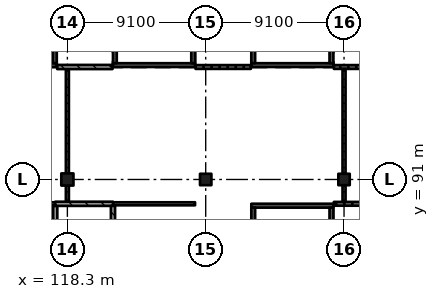
"""IFC4 building model, lengths in metres.
Left out: names, types, materials, properties, quantities, classifications, styles, units other than length and angle.
Written with IfcOpenShell. Run it as: python <this file> out.ifc"""

import sys

from ifc_helpers import new_model, si_unit, direction, frame, frame_2d, origin, origin_2d, place, context, subcontext, project, spatial, rectangle, extrude, element, fill, save


model = new_model("IFC4")
c1 = context("Model", 3, precision=1e-05, world=origin(), true_north=direction((0.0, 1.0)))
c2 = subcontext(c1, "Body", "Model", "MODEL_VIEW")
j1 = project(units=[si_unit("LENGTHUNIT", "METRE"), si_unit("PLANEANGLEUNIT", "RADIAN")], contexts=[c1])
p1 = place(None, origin())
s1 = spatial("IfcSite", under=j1, at=p1, CompositionType="ELEMENT")
p2 = place(p1, origin())
s2 = spatial("IfcBuilding", under=s1, at=p2, CompositionType="ELEMENT")
p3 = place(p2, frame((0.0, 0.0, 10.92)))
s3 = spatial("IfcBuildingStorey", under=s2, at=p3, CompositionType="ELEMENT", Elevation=10.92)
p4 = place(p3, frame((118.3, 91.0, 0.0), z_axis=(0.0, 0.0, 1.0), x_axis=(1.0, 0.0, 0.0)))
e1 = element("IfcColumn", 1, at=p4, inside=s3, PredefinedType="COLUMN", context=c2, shape_type="SweptSolid", body=[
    extrude(rectangle(XDim=0.8, YDim=0.8, at=origin_2d()), origin(), (0.0, 0.0, 1.0), 4.55),
])
for number, where, z_axis, x_axis in (
    (2, (127.4, 91.0, 0.0), (0.0, 0.0, 1.0), (1.0, 0.0, 0.0)),
    (3, (136.5, 91.0, 0.0), (0.0, 0.0, 1.0), (1.0, 0.0, 0.0)),
):
    element("IfcColumn", number, at=place(p3, frame(where, z_axis=z_axis, x_axis=x_axis)), inside=s3, PredefinedType="COLUMN", context=c2, shape_type="SweptSolid", body=[
        extrude(rectangle(XDim=0.75, YDim=0.75, at=origin_2d()), origin(), (0.0, 0.0, 1.0), 4.55),
    ])
p5 = place(p3, frame((135.8, 98.525, 0.0), z_axis=(0.0, 0.0, 1.0), x_axis=(-1.0, 0.0, 0.0)))
e4 = element("IfcWall", 4, at=p5, inside=s3, PredefinedType="SHEAR", context=c2, shape_type="SweptSolid", body=[
    extrude(rectangle(XDim=5.4, YDim=0.25, at=frame_2d((2.7, 0.0))), origin(), (0.0, 0.0, 1.0), 4.55),
])
p6 = place(p5, frame((1.5, 0.0, 0.0)))
e5 = element("IfcOpeningElement", 5, at=p6, cuts=e4, PredefinedType="OPENING", context=c2, shape_type="SweptSolid", body=[
    extrude(rectangle(XDim=2.4, YDim=2.1, at=frame_2d((1.2, 1.05))), frame((0.0, 0.135, 0.0), z_axis=(0.0, -1.0, 0.0), x_axis=(1.0, 0.0, 0.0)), (0.0, 0.0, 1.0), 0.27),
])
for number, where, z_axis, x_axis in (
    (6, (130.525, 108.25, 0.0), (0.0, 0.0, 1.0), (0.0, -1.0, 0.0)),
    (7, (135.675, 108.25, 0.0), (0.0, 0.0, 1.0), (0.0, -1.0, 0.0)),
):
    element("IfcWall", number, at=place(p3, frame(where, z_axis=z_axis, x_axis=x_axis)), inside=s3, PredefinedType="SHEAR", context=c2, shape_type="SweptSolid", body=[
        extrude(rectangle(XDim=9.6, YDim=0.25, at=frame_2d((4.8, 0.0))), origin(), (0.0, 0.0, 1.0), 4.55),
    ])
p7 = place(p3, frame((126.7, 98.525, 0.0), z_axis=(0.0, 0.0, 1.0), x_axis=(-1.0, 0.0, 0.0)))
e8 = element("IfcWall", 8, at=p7, inside=s3, PredefinedType="SHEAR", context=c2, shape_type="SweptSolid", body=[
    extrude(rectangle(XDim=5.4, YDim=0.25, at=frame_2d((2.7, 0.0))), origin(), (0.0, 0.0, 1.0), 4.55),
])
p8 = place(p7, frame((1.5, 0.0, 0.0)))
e9 = element("IfcOpeningElement", 9, at=p8, cuts=e8, PredefinedType="OPENING", context=c2, shape_type="SweptSolid", body=[
    extrude(rectangle(XDim=2.4, YDim=2.1, at=frame_2d((1.2, 1.05))), frame((0.0, 0.135, 0.0), z_axis=(0.0, -1.0, 0.0), x_axis=(1.0, 0.0, 0.0)), (0.0, 0.0, 1.0), 0.27),
])
for number, where, z_axis, x_axis in (
    (10, (121.425, 108.25, 0.0), (0.0, 0.0, 1.0), (0.0, -1.0, 0.0)),
    (11, (126.575, 108.25, 0.0), (0.0, 0.0, 1.0), (0.0, -1.0, 0.0)),
):
    element("IfcWall", number, at=place(p3, frame(where, z_axis=z_axis, x_axis=x_axis)), inside=s3, PredefinedType="SHEAR", context=c2, shape_type="SweptSolid", body=[
        extrude(rectangle(XDim=9.6, YDim=0.25, at=frame_2d((4.8, 0.0))), origin(), (0.0, 0.0, 1.0), 4.55),
    ])
p9 = place(p3, frame((117.6, 98.525, 0.0), z_axis=(0.0, 0.0, 1.0), x_axis=(-1.0, 0.0, 0.0)))
e12 = element("IfcWall", 12, at=p9, inside=s3, PredefinedType="SHEAR", context=c2, shape_type="SweptSolid", body=[
    extrude(rectangle(XDim=5.4, YDim=0.25, at=frame_2d((2.7, 0.0))), origin(), (0.0, 0.0, 1.0), 4.55),
])
p10 = place(p9, frame((1.5, 0.0, 0.0)))
e13 = element("IfcOpeningElement", 13, at=p10, cuts=e12, PredefinedType="OPENING", context=c2, shape_type="SweptSolid", body=[
    extrude(rectangle(XDim=2.4, YDim=2.1, at=frame_2d((1.2, 1.05))), frame((0.0, 0.135, 0.0), z_axis=(0.0, -1.0, 0.0), x_axis=(1.0, 0.0, 0.0)), (0.0, 0.0, 1.0), 0.27),
])
p11 = place(p3, frame((117.475, 108.25, 0.0), z_axis=(0.0, 0.0, 1.0), x_axis=(0.0, -1.0, 0.0)))
e14 = element("IfcWall", 14, at=p11, inside=s3, PredefinedType="SHEAR", context=c2, shape_type="SweptSolid", body=[
    extrude(rectangle(XDim=9.6, YDim=0.25, at=frame_2d((4.8, 0.0))), origin(), (0.0, 0.0, 1.0), 4.55),
])
p12 = place(p3, frame((135.8, 89.275, 0.0), z_axis=(0.0, 0.0, 1.0), x_axis=(-1.0, 0.0, 0.0)))
e15 = element("IfcWall", 15, at=p12, inside=s3, PredefinedType="SHEAR", context=c2, shape_type="SweptSolid", body=[
    extrude(rectangle(XDim=5.4, YDim=0.25, at=frame_2d((2.7, 0.0))), origin(), (0.0, 0.0, 1.0), 4.55),
])
p13 = place(p12, frame((1.5, 0.0, 0.0)))
e16 = element("IfcOpeningElement", 16, at=p13, cuts=e15, PredefinedType="OPENING", context=c2, shape_type="SweptSolid", body=[
    extrude(rectangle(XDim=2.4, YDim=2.1, at=frame_2d((1.2, 1.05))), frame((0.0, 0.135, 0.0), z_axis=(0.0, -1.0, 0.0), x_axis=(1.0, 0.0, 0.0)), (0.0, 0.0, 1.0), 0.27),
])
for number, where, z_axis, x_axis in (
    (17, (130.525, 89.15, 0.0), (0.0, 0.0, 1.0), (0.0, -1.0, 0.0)),
    (18, (135.675, 89.15, 0.0), (0.0, 0.0, 1.0), (0.0, -1.0, 0.0)),
):
    element("IfcWall", number, at=place(p3, frame(where, z_axis=z_axis, x_axis=x_axis)), inside=s3, PredefinedType="SHEAR", context=c2, shape_type="SweptSolid", body=[
        extrude(rectangle(XDim=9.6, YDim=0.25, at=frame_2d((4.8, 0.0))), origin(), (0.0, 0.0, 1.0), 4.55),
    ])
p14 = place(p3, frame((117.5, 86.43, 0.0), z_axis=(0.0, 0.0, 1.0), x_axis=(0.0, 1.0, 0.0)))
e19 = element("IfcWall", 19, at=p14, inside=s3, PredefinedType="SOLIDWALL", context=c2, shape_type="SweptSolid", body=[
    extrude(rectangle(XDim=2.833, YDim=0.275, at=frame_2d((1.416, 0.0))), origin(), (0.0, 0.0, 1.0), 4.25),
])
p15 = place(p3, frame((117.5, 89.4, 0.0), z_axis=(0.0, 0.0, 1.0), x_axis=(-1.0, 0.0, 0.0)))
e20 = element("IfcWall", 20, at=p15, inside=s3, PredefinedType="PARTITIONING", context=c2, shape_type="SweptSolid", body=[
    extrude(rectangle(XDim=5.3, YDim=0.2, at=frame_2d((2.65, 0.0))), origin(), (0.0, 0.0, 1.0), 4.25),
])
p16 = place(p15, frame((1.75, 0.0, 0.0)))
e21 = element("IfcOpeningElement", 21, at=p16, cuts=e20, PredefinedType="OPENING", context=c2, shape_type="SweptSolid", body=[
    extrude(rectangle(XDim=1.8, YDim=2.4, at=frame_2d((0.9, 1.2))), frame((0.0, 0.11, 0.0), z_axis=(0.0, -1.0, 0.0), x_axis=(1.0, 0.0, 0.0)), (0.0, 0.0, 1.0), 0.22),
])
p17 = place(p3, frame((117.63, 98.4, 0.0), z_axis=(0.0, 0.0, 1.0), x_axis=(1.0, 0.0, 0.0)))
e22 = element("IfcWall", 22, at=p17, inside=s3, PredefinedType="SOLIDWALL", context=c2, shape_type="SweptSolid", body=[
    extrude(rectangle(XDim=3.64, YDim=0.275, at=frame_2d((1.82, 0.0))), origin(), (0.0, 0.0, 1.0), 4.25),
])
p18 = place(p17, frame((1.52, 0.0, 0.0)))
e23 = element("IfcOpeningElement", 23, at=p18, cuts=e22, PredefinedType="OPENING", context=c2, shape_type="SweptSolid", body=[
    extrude(rectangle(XDim=1.2, YDim=2.4, at=frame_2d((0.6, 1.2))), frame((0.0, 0.147, 0.0), z_axis=(0.0, -1.0, 0.0), x_axis=(1.0, 0.0, 0.0)), (0.0, 0.0, 1.0), 0.295),
])
p19 = place(p3, frame((117.5, 89.4, 0.0), z_axis=(0.0, 0.0, 1.0), x_axis=(1.0, 0.0, 0.0)))
e24 = element("IfcWall", 24, at=p19, inside=s3, PredefinedType="SOLIDWALL", context=c2, shape_type="SweptSolid", body=[
    extrude(rectangle(XDim=3.8, YDim=0.275, at=frame_2d((1.9, 0.0))), origin(), (0.0, 0.0, 1.0), 4.25),
])
p20 = place(p19, frame((1.65, 0.0, 0.0)))
e25 = element("IfcOpeningElement", 25, at=p20, cuts=e24, PredefinedType="OPENING", context=c2, shape_type="SweptSolid", body=[
    extrude(rectangle(XDim=1.2, YDim=2.4, at=frame_2d((0.6, 1.2))), frame((0.0, 0.147, 0.0), z_axis=(0.0, -1.0, 0.0), x_axis=(1.0, 0.0, 0.0)), (0.0, 0.0, 1.0), 0.295),
])
p21 = place(p3, frame((118.3, 89.538, 0.0), z_axis=(0.0, 0.0, 1.0), x_axis=(0.0, 1.0, 0.0)))
e26 = element("IfcWall", 26, at=p21, inside=s3, PredefinedType="PARTITIONING", context=c2, shape_type="SweptSolid", body=[
    extrude(rectangle(XDim=1.062, YDim=0.2, at=frame_2d((0.531, 0.0))), origin(), (0.0, 0.0, 1.0), 3.55),
])
p22 = place(p3, frame((118.3, 91.4, 0.0), z_axis=(0.0, 0.0, 1.0), x_axis=(0.0, 1.0, 0.0)))
e27 = element("IfcWall", 27, at=p22, inside=s3, PredefinedType="PARTITIONING", context=c2, shape_type="SweptSolid", body=[
    extrude(rectangle(XDim=6.863, YDim=0.2, at=frame_2d((3.431, 0.0))), origin(), (0.0, 0.0, 1.0), 3.55),
])
p23 = place(p22, frame((0.85, 0.0, 0.0)))
e28 = element("IfcOpeningElement", 28, at=p23, cuts=e27, PredefinedType="OPENING", context=c2, shape_type="SweptSolid", body=[
    extrude(rectangle(XDim=1.8, YDim=2.4, at=frame_2d((0.9, 1.2))), frame((0.0, 0.11, 0.0), z_axis=(0.0, -1.0, 0.0), x_axis=(1.0, 0.0, 0.0)), (0.0, 0.0, 1.0), 0.22),
])
p24 = place(p22, frame((4.25, 0.0, 0.0)))
e29 = element("IfcOpeningElement", 29, at=p24, cuts=e27, PredefinedType="OPENING", context=c2, shape_type="SweptSolid", body=[
    extrude(rectangle(XDim=1.8, YDim=2.4, at=frame_2d((0.9, 1.2))), frame((0.0, 0.11, 0.0), z_axis=(0.0, -1.0, 0.0), x_axis=(1.0, 0.0, 0.0)), (0.0, 0.0, 1.0), 0.22),
])
p25 = place(p3, frame((121.3, 89.262, 0.0), z_axis=(0.0, 0.0, 1.0), x_axis=(0.0, -1.0, 0.0)))
e30 = element("IfcWall", 30, at=p25, inside=s3, PredefinedType="SOLIDWALL", context=c2, shape_type="SweptSolid", body=[
    extrude(rectangle(XDim=2.725, YDim=0.275, at=frame_2d((1.362, 0.0))), origin(), (0.0, 0.0, 1.0), 4.25),
])
p26 = place(p3, frame((126.7, 89.4, 0.0), z_axis=(0.0, 0.0, 1.0), x_axis=(-1.0, 0.0, 0.0)))
e31 = element("IfcWall", 31, at=p26, inside=s3, PredefinedType="PARTITIONING", context=c2, shape_type="SweptSolid", body=[
    extrude(rectangle(XDim=5.4, YDim=0.2, at=frame_2d((2.7, 0.0))), origin(), (0.0, 0.0, 1.0), 4.25),
])
p27 = place(p26, frame((1.85, 0.0, 0.0)))
e32 = element("IfcOpeningElement", 32, at=p27, cuts=e31, PredefinedType="OPENING", context=c2, shape_type="SweptSolid", body=[
    extrude(rectangle(XDim=1.8, YDim=2.4, at=frame_2d((0.9, 1.2))), frame((0.0, 0.11, 0.0), z_axis=(0.0, -1.0, 0.0), x_axis=(1.0, 0.0, 0.0)), (0.0, 0.0, 1.0), 0.22),
])
p28 = place(p3, frame((126.73, 98.4, 0.0), z_axis=(0.0, 0.0, 1.0), x_axis=(1.0, 0.0, 0.0)))
e33 = element("IfcWall", 33, at=p28, inside=s3, PredefinedType="SOLIDWALL", context=c2, shape_type="SweptSolid", body=[
    extrude(rectangle(XDim=3.64, YDim=0.25, at=frame_2d((1.82, 0.0))), origin(), (0.0, 0.0, 1.0), 4.25),
])
p29 = place(p28, frame((1.35, 0.0, 0.0)))
e34 = element("IfcOpeningElement", 34, at=p29, cuts=e33, PredefinedType="OPENING", context=c2, shape_type="SweptSolid", body=[
    extrude(rectangle(XDim=1.0, YDim=2.1, at=frame_2d((0.5, 1.05))), frame((0.0, 0.135, 0.0), z_axis=(0.0, -1.0, 0.0), x_axis=(1.0, 0.0, 0.0)), (0.0, 0.0, 1.0), 0.27),
])
p30 = place(p3, frame((135.83, 98.4, 0.0), z_axis=(0.0, 0.0, 1.0), x_axis=(1.0, 0.0, 0.0)))
e35 = element("IfcWall", 35, at=p30, inside=s3, PredefinedType="SOLIDWALL", context=c2, shape_type="SweptSolid", body=[
    extrude(rectangle(XDim=3.64, YDim=0.25, at=frame_2d((1.82, 0.0))), origin(), (0.0, 0.0, 1.0), 4.25),
])
p31 = place(p30, frame((1.72, 0.0, 0.0)))
e36 = element("IfcOpeningElement", 36, at=p31, cuts=e35, PredefinedType="OPENING", context=c2, shape_type="SweptSolid", body=[
    extrude(rectangle(XDim=0.8, YDim=2.1, at=frame_2d((0.4, 1.05))), frame((0.0, 0.135, 0.0), z_axis=(0.0, -1.0, 0.0), x_axis=(1.0, 0.0, 0.0)), (0.0, 0.0, 1.0), 0.27),
])
p32 = place(p3, frame((135.83, 89.4, 0.0), z_axis=(0.0, 0.0, 1.0), x_axis=(1.0, 0.0, 0.0)))
e37 = element("IfcWall", 37, at=p32, inside=s3, PredefinedType="SOLIDWALL", context=c2, shape_type="SweptSolid", body=[
    extrude(rectangle(XDim=3.64, YDim=0.25, at=frame_2d((1.82, 0.0))), origin(), (0.0, 0.0, 1.0), 4.25),
])
p33 = place(p32, frame((1.79, 0.0, 0.0)))
e38 = element("IfcOpeningElement", 38, at=p33, cuts=e37, PredefinedType="OPENING", context=c2, shape_type="SweptSolid", body=[
    extrude(rectangle(XDim=0.8, YDim=2.1, at=frame_2d((0.4, 1.05))), frame((0.0, 0.135, 0.0), z_axis=(0.0, -1.0, 0.0), x_axis=(1.0, 0.0, 0.0)), (0.0, 0.0, 1.0), 0.27),
])
p34 = place(p3, frame((136.5, 89.525, 0.0), z_axis=(0.0, 0.0, 1.0), x_axis=(0.0, 1.0, 0.0)))
e39 = element("IfcWall", 39, at=p34, inside=s3, PredefinedType="PARTITIONING", context=c2, shape_type="SweptSolid", body=[
    extrude(rectangle(XDim=1.1, YDim=0.2, at=frame_2d((0.55, 0.0))), origin(), (0.0, 0.0, 1.0), 3.5),
])
p35 = place(p3, frame((136.5, 91.375, 0.0), z_axis=(0.0, 0.0, 1.0), x_axis=(0.0, 1.0, 0.0)))
e40 = element("IfcWall", 40, at=p35, inside=s3, PredefinedType="PARTITIONING", context=c2, shape_type="SweptSolid", body=[
    extrude(rectangle(XDim=6.9, YDim=0.2, at=frame_2d((3.45, 0.0))), origin(), (0.0, 0.0, 1.0), 3.55),
])
p36 = place(p35, frame((0.85, 0.0, 0.0)))
e41 = element("IfcOpeningElement", 41, at=p36, cuts=e40, PredefinedType="OPENING", context=c2, shape_type="SweptSolid", body=[
    extrude(rectangle(XDim=1.8, YDim=2.4, at=frame_2d((0.9, 1.2))), frame((0.0, 0.11, 0.0), z_axis=(0.0, -1.0, 0.0), x_axis=(1.0, 0.0, 0.0)), (0.0, 0.0, 1.0), 0.22),
])
p37 = place(p35, frame((4.25, 0.0, 0.0)))
e42 = element("IfcOpeningElement", 42, at=p37, cuts=e40, PredefinedType="OPENING", context=c2, shape_type="SweptSolid", body=[
    extrude(rectangle(XDim=1.8, YDim=2.4, at=frame_2d((0.9, 1.2))), frame((0.0, 0.11, 0.0), z_axis=(0.0, -1.0, 0.0), x_axis=(1.0, 0.0, 0.0)), (0.0, 0.0, 1.0), 0.22),
])
p38 = place(p20, origin())
e43 = element("IfcDoor", 43, at=p38, inside=s3, OperationType="SINGLE_SWING_LEFT", PredefinedType="DOOR", context=c2, shape_type="SweptSolid", body=[
    extrude(rectangle(XDim=1.2, YDim=2.4, at=frame_2d((0.6, 1.2))), frame((0.0, 0.025, 0.0), z_axis=(0.0, -1.0, 0.0), x_axis=(1.0, 0.0, 0.0)), (0.0, 0.0, 1.0), 0.05),
])
fill(e25, e43)
p39 = place(p29, origin())
e44 = element("IfcDoor", 44, at=p39, inside=s3, OperationType="SINGLE_SWING_LEFT", PredefinedType="DOOR", context=c2, shape_type="SweptSolid", body=[
    extrude(rectangle(XDim=1.0, YDim=2.1, at=frame_2d((0.5, 1.05))), frame((0.0, 0.025, 0.0), z_axis=(0.0, -1.0, 0.0), x_axis=(1.0, 0.0, 0.0)), (0.0, 0.0, 1.0), 0.05),
])
fill(e34, e44)
p40 = place(p18, origin())
e45 = element("IfcDoor", 45, at=p40, inside=s3, OperationType="SINGLE_SWING_RIGHT", PredefinedType="DOOR", context=c2, shape_type="SweptSolid", body=[
    extrude(rectangle(XDim=1.2, YDim=2.4, at=frame_2d((0.6, 1.2))), frame((0.0, 0.025, 0.0), z_axis=(0.0, -1.0, 0.0), x_axis=(1.0, 0.0, 0.0)), (0.0, 0.0, 1.0), 0.05),
])
fill(e23, e45)
p41 = place(p36, origin())
e46 = element("IfcDoor", 46, at=p41, inside=s3, OperationType="DOUBLE_DOOR_SINGLE_SWING", PredefinedType="DOOR", context=c2, shape_type="SweptSolid", body=[
    extrude(rectangle(XDim=1.8, YDim=2.4, at=frame_2d((0.9, 1.2))), frame((0.0, 0.025, 0.0), z_axis=(0.0, -1.0, 0.0), x_axis=(1.0, 0.0, 0.0)), (0.0, 0.0, 1.0), 0.05),
])
fill(e41, e46)
p42 = place(p37, origin())
e47 = element("IfcDoor", 47, at=p42, inside=s3, OperationType="DOUBLE_DOOR_SINGLE_SWING", PredefinedType="DOOR", context=c2, shape_type="SweptSolid", body=[
    extrude(rectangle(XDim=1.8, YDim=2.4, at=frame_2d((0.9, 1.2))), frame((0.0, 0.025, 0.0), z_axis=(0.0, -1.0, 0.0), x_axis=(1.0, 0.0, 0.0)), (0.0, 0.0, 1.0), 0.05),
])
fill(e42, e47)
p43 = place(p23, origin())
e48 = element("IfcDoor", 48, at=p43, inside=s3, OperationType="DOUBLE_DOOR_SINGLE_SWING", PredefinedType="DOOR", context=c2, shape_type="SweptSolid", body=[
    extrude(rectangle(XDim=1.8, YDim=2.4, at=frame_2d((0.9, 1.2))), frame((0.0, 0.025, 0.0), z_axis=(0.0, -1.0, 0.0), x_axis=(1.0, 0.0, 0.0)), (0.0, 0.0, 1.0), 0.05),
])
fill(e28, e48)
p44 = place(p24, origin())
e49 = element("IfcDoor", 49, at=p44, inside=s3, OperationType="DOUBLE_DOOR_SINGLE_SWING", PredefinedType="DOOR", context=c2, shape_type="SweptSolid", body=[
    extrude(rectangle(XDim=1.8, YDim=2.4, at=frame_2d((0.9, 1.2))), frame((0.0, 0.025, 0.0), z_axis=(0.0, -1.0, 0.0), x_axis=(1.0, 0.0, 0.0)), (0.0, 0.0, 1.0), 0.05),
])
fill(e29, e49)
p45 = place(p27, origin())
e50 = element("IfcDoor", 50, at=p45, inside=s3, OperationType="DOUBLE_DOOR_SINGLE_SWING", PredefinedType="DOOR", context=c2, shape_type="SweptSolid", body=[
    extrude(rectangle(XDim=1.8, YDim=2.4, at=frame_2d((0.9, 1.2))), frame((0.0, 0.025, 0.0), z_axis=(0.0, -1.0, 0.0), x_axis=(1.0, 0.0, 0.0)), (0.0, 0.0, 1.0), 0.05),
])
fill(e32, e50)
p46 = place(p6, origin())
e51 = element("IfcDoor", 51, at=p46, inside=s3, OperationType="DOUBLE_DOOR_SINGLE_SWING", PredefinedType="DOOR", context=c2, shape_type="SweptSolid", body=[
    extrude(rectangle(XDim=2.4, YDim=2.1, at=frame_2d((1.2, 1.05))), frame((0.0, 0.025, 0.0), z_axis=(0.0, -1.0, 0.0), x_axis=(1.0, 0.0, 0.0)), (0.0, 0.0, 1.0), 0.05),
])
fill(e5, e51)
p47 = place(p8, origin())
e52 = element("IfcDoor", 52, at=p47, inside=s3, OperationType="DOUBLE_DOOR_SINGLE_SWING", PredefinedType="DOOR", context=c2, shape_type="SweptSolid", body=[
    extrude(rectangle(XDim=2.4, YDim=2.1, at=frame_2d((1.2, 1.05))), frame((0.0, 0.025, 0.0), z_axis=(0.0, -1.0, 0.0), x_axis=(1.0, 0.0, 0.0)), (0.0, 0.0, 1.0), 0.05),
])
fill(e9, e52)
p48 = place(p13, origin())
e53 = element("IfcDoor", 53, at=p48, inside=s3, OperationType="DOUBLE_DOOR_SINGLE_SWING", PredefinedType="DOOR", context=c2, shape_type="SweptSolid", body=[
    extrude(rectangle(XDim=2.4, YDim=2.1, at=frame_2d((1.2, 1.05))), frame((0.0, 0.025, 0.0), z_axis=(0.0, -1.0, 0.0), x_axis=(1.0, 0.0, 0.0)), (0.0, 0.0, 1.0), 0.05),
])
fill(e16, e53)
save(model, sys.argv[1])
